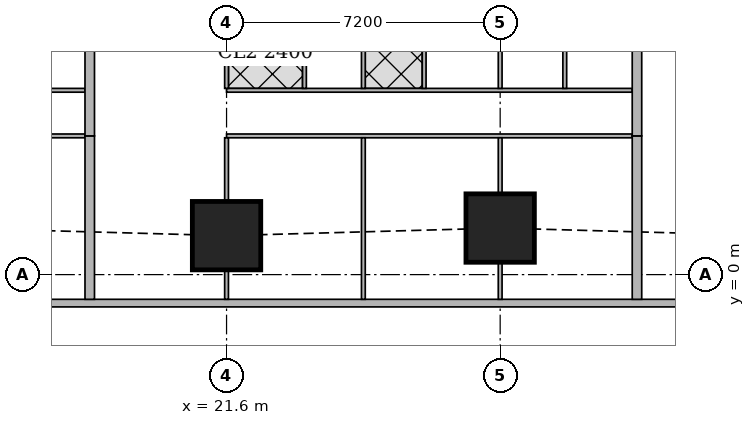
"""IFC4 building model, lengths in metres.
Left out: names, types, materials, properties, quantities, classifications, styles, units other than length and angle.
Written with IfcOpenShell. Run it as: python <this file> out.ifc"""

import sys

from ifc_helpers import new_model, si_unit, direction, frame, frame_2d, origin, origin_2d, place, context, subcontext, project, spatial, rectangle, extrude, element, fill, save


model = new_model("IFC4")
c1 = context("Model", 3, precision=1e-05, world=origin(), true_north=direction((0.0, 1.0)))
c2 = subcontext(c1, "Body", "Model", "MODEL_VIEW")
j1 = project(units=[si_unit("LENGTHUNIT", "METRE"), si_unit("PLANEANGLEUNIT", "RADIAN")], contexts=[c1])
p1 = place(None, origin())
s1 = spatial("IfcSite", under=j1, at=p1, CompositionType="ELEMENT")
p2 = place(p1, origin())
s2 = spatial("IfcBuilding", under=s1, at=p2, CompositionType="ELEMENT")
p3 = place(p2, frame((0.0, 0.0, 139.55)))
s3 = spatial("IfcBuildingStorey", under=s2, at=p3, CompositionType="ELEMENT", Elevation=139.55)
for number, where, z_axis, x_axis in (
    (1, (21.6, 1.025, 0.0), (0.0, 0.0, 1.0), (1.0, 0.0, 0.0)),
    (2, (28.8, 1.225, 0.0), (0.0, 0.0, 1.0), (1.0, 0.0, 0.0)),
):
    element("IfcColumn", number, at=place(p3, frame(where, z_axis=z_axis, x_axis=x_axis)), inside=s3, PredefinedType="COLUMN", context=c2, shape_type="SweptSolid", body=[
        extrude(rectangle(XDim=1.8, YDim=1.8, at=origin_2d()), origin(), (0.0, 0.0, 1.0), 3.75),
    ])
p4 = place(p3, frame((2.163, -0.75, 0.0), z_axis=(0.0, 0.0, 1.0), x_axis=(1.0, 0.0, 0.0)))
e3 = element("IfcWall", 3, at=p4, inside=s3, PredefinedType="SOLIDWALL", context=c2, shape_type="SweptSolid", body=[
    extrude(rectangle(XDim=45.628, YDim=0.2, at=frame_2d((22.814, 0.0))), origin(), (0.0, 0.0, 1.0), 3.5),
])
p5 = place(p4, frame((9.537, 0.0, 0.9)))
e4 = element("IfcOpeningElement", 4, at=p5, cuts=e3, PredefinedType="OPENING", context=c2, shape_type="SweptSolid", body=[
    extrude(rectangle(XDim=1.8, YDim=1.5, at=frame_2d((0.9, 0.75))), frame((0.0, 0.11, 0.0), z_axis=(0.0, -1.0, 0.0), x_axis=(1.0, 0.0, 0.0)), (0.0, 0.0, 1.0), 0.22),
])
p6 = place(p4, frame((13.137, 0.0, 0.9)))
e5 = element("IfcOpeningElement", 5, at=p6, cuts=e3, PredefinedType="OPENING", context=c2, shape_type="SweptSolid", body=[
    extrude(rectangle(XDim=1.8, YDim=1.5, at=frame_2d((0.9, 0.75))), frame((0.0, 0.11, 0.0), z_axis=(0.0, -1.0, 0.0), x_axis=(1.0, 0.0, 0.0)), (0.0, 0.0, 1.0), 0.22),
])
p7 = place(p4, frame((16.737, 0.0, 0.9)))
e6 = element("IfcOpeningElement", 6, at=p7, cuts=e3, PredefinedType="OPENING", context=c2, shape_type="SweptSolid", body=[
    extrude(rectangle(XDim=1.8, YDim=1.5, at=frame_2d((0.9, 0.75))), frame((0.0, 0.11, 0.0), z_axis=(0.0, -1.0, 0.0), x_axis=(1.0, 0.0, 0.0)), (0.0, 0.0, 1.0), 0.22),
])
p8 = place(p4, frame((20.337, 0.0, 0.9)))
e7 = element("IfcOpeningElement", 7, at=p8, cuts=e3, PredefinedType="OPENING", context=c2, shape_type="SweptSolid", body=[
    extrude(rectangle(XDim=1.8, YDim=1.5, at=frame_2d((0.9, 0.75))), frame((0.0, 0.11, 0.0), z_axis=(0.0, -1.0, 0.0), x_axis=(1.0, 0.0, 0.0)), (0.0, 0.0, 1.0), 0.22),
])
p9 = place(p4, frame((23.937, 0.0, 0.9)))
e8 = element("IfcOpeningElement", 8, at=p9, cuts=e3, PredefinedType="OPENING", context=c2, shape_type="SweptSolid", body=[
    extrude(rectangle(XDim=1.8, YDim=1.5, at=frame_2d((0.9, 0.75))), frame((0.0, 0.11, 0.0), z_axis=(0.0, -1.0, 0.0), x_axis=(1.0, 0.0, 0.0)), (0.0, 0.0, 1.0), 0.22),
])
p10 = place(p4, frame((27.537, 0.0, 0.9)))
e9 = element("IfcOpeningElement", 9, at=p10, cuts=e3, PredefinedType="OPENING", context=c2, shape_type="SweptSolid", body=[
    extrude(rectangle(XDim=1.8, YDim=1.5, at=frame_2d((0.9, 0.75))), frame((0.0, 0.11, 0.0), z_axis=(0.0, -1.0, 0.0), x_axis=(1.0, 0.0, 0.0)), (0.0, 0.0, 1.0), 0.22),
])
p11 = place(p4, frame((31.137, 0.0, 0.9)))
e10 = element("IfcOpeningElement", 10, at=p11, cuts=e3, PredefinedType="OPENING", context=c2, shape_type="SweptSolid", body=[
    extrude(rectangle(XDim=1.8, YDim=1.5, at=frame_2d((0.9, 0.75))), frame((0.0, 0.11, 0.0), z_axis=(0.0, -1.0, 0.0), x_axis=(1.0, 0.0, 0.0)), (0.0, 0.0, 1.0), 0.22),
])
p12 = place(p4, frame((34.737, 0.0, 0.9)))
e11 = element("IfcOpeningElement", 11, at=p12, cuts=e3, PredefinedType="OPENING", context=c2, shape_type="SweptSolid", body=[
    extrude(rectangle(XDim=1.8, YDim=1.5, at=frame_2d((0.9, 0.75))), frame((0.0, 0.11, 0.0), z_axis=(0.0, -1.0, 0.0), x_axis=(1.0, 0.0, 0.0)), (0.0, 0.0, 1.0), 0.22),
])
p13 = place(p3, frame((17.875, 3.65, 0.0), z_axis=(0.0, 0.0, 1.0), x_axis=(-1.0, 0.0, 0.0)))
e12 = element("IfcWall", 12, at=p13, inside=s3, PredefinedType="PARTITIONING", context=c2, shape_type="SweptSolid", body=[
    extrude(rectangle(XDim=3.475, YDim=0.1, at=frame_2d((1.738, 0.0))), origin(), (0.0, 0.0, 1.0), 3.5),
])
p14 = place(p13, frame((2.375, 0.0, 0.0)))
e13 = element("IfcOpeningElement", 13, at=p14, cuts=e12, PredefinedType="OPENING", context=c2, shape_type="SweptSolid", body=[
    extrude(rectangle(XDim=0.9, YDim=2.1, at=frame_2d((0.45, 1.05))), frame((0.0, 0.06, 0.0), z_axis=(0.0, -1.0, 0.0), x_axis=(1.0, 0.0, 0.0)), (0.0, 0.0, 1.0), 0.12),
])
p15 = place(p3, frame((17.875, 4.85, 0.0), z_axis=(0.0, 0.0, 1.0), x_axis=(-1.0, 0.0, 0.0)))
e14 = element("IfcWall", 14, at=p15, inside=s3, PredefinedType="PARTITIONING", context=c2, shape_type="SweptSolid", body=[
    extrude(rectangle(XDim=3.475, YDim=0.1, at=frame_2d((1.738, 0.0))), origin(), (0.0, 0.0, 1.0), 3.5),
])
p16 = place(p15, frame((2.0, 0.0, 0.0)))
e15 = element("IfcOpeningElement", 15, at=p16, cuts=e14, PredefinedType="OPENING", context=c2, shape_type="SweptSolid", body=[
    extrude(rectangle(XDim=0.9, YDim=2.1, at=frame_2d((0.45, 1.05))), frame((0.0, 0.06, 0.0), z_axis=(0.0, -1.0, 0.0), x_axis=(1.0, 0.0, 0.0)), (0.0, 0.0, 1.0), 0.12),
])
p17 = place(p15, frame((0.2, 0.0, 0.0)))
e16 = element("IfcOpeningElement", 16, at=p17, cuts=e14, PredefinedType="OPENING", context=c2, shape_type="SweptSolid", body=[
    extrude(rectangle(XDim=0.9, YDim=2.1, at=frame_2d((0.45, 1.05))), frame((0.0, 0.06, 0.0), z_axis=(0.0, -1.0, 0.0), x_axis=(1.0, 0.0, 0.0)), (0.0, 0.0, 1.0), 0.12),
])
p18 = place(p3, frame((32.275, 3.65, 0.0), z_axis=(0.0, 0.0, 1.0), x_axis=(-1.0, 0.0, 0.0)))
e17 = element("IfcWall", 17, at=p18, inside=s3, PredefinedType="PARTITIONING", context=c2, shape_type="SweptSolid", body=[
    extrude(rectangle(XDim=10.675, YDim=0.1, at=frame_2d((5.337, 0.0))), origin(), (0.0, 0.0, 1.0), 3.5),
])
p19 = place(p18, frame((9.575, 0.0, 0.0)))
e18 = element("IfcOpeningElement", 18, at=p19, cuts=e17, PredefinedType="OPENING", context=c2, shape_type="SweptSolid", body=[
    extrude(rectangle(XDim=0.9, YDim=2.1, at=frame_2d((0.45, 1.05))), frame((0.0, 0.06, 0.0), z_axis=(0.0, -1.0, 0.0), x_axis=(1.0, 0.0, 0.0)), (0.0, 0.0, 1.0), 0.12),
])
p20 = place(p18, frame((5.975, 0.0, 0.0)))
e19 = element("IfcOpeningElement", 19, at=p20, cuts=e17, PredefinedType="OPENING", context=c2, shape_type="SweptSolid", body=[
    extrude(rectangle(XDim=0.9, YDim=2.1, at=frame_2d((0.45, 1.05))), frame((0.0, 0.06, 0.0), z_axis=(0.0, -1.0, 0.0), x_axis=(1.0, 0.0, 0.0)), (0.0, 0.0, 1.0), 0.12),
])
p21 = place(p18, frame((2.375, 0.0, 0.0)))
e20 = element("IfcOpeningElement", 20, at=p21, cuts=e17, PredefinedType="OPENING", context=c2, shape_type="SweptSolid", body=[
    extrude(rectangle(XDim=0.9, YDim=2.1, at=frame_2d((0.45, 1.05))), frame((0.0, 0.06, 0.0), z_axis=(0.0, -1.0, 0.0), x_axis=(1.0, 0.0, 0.0)), (0.0, 0.0, 1.0), 0.12),
])
p22 = place(p3, frame((32.275, 4.85, 0.0), z_axis=(0.0, 0.0, 1.0), x_axis=(-1.0, 0.0, 0.0)))
e21 = element("IfcWall", 21, at=p22, inside=s3, PredefinedType="PARTITIONING", context=c2, shape_type="SweptSolid", body=[
    extrude(rectangle(XDim=10.675, YDim=0.1, at=frame_2d((5.337, 0.0))), origin(), (0.0, 0.0, 1.0), 3.5),
])
p23 = place(p22, frame((9.2, 0.0, 0.0)))
e22 = element("IfcOpeningElement", 22, at=p23, cuts=e21, PredefinedType="OPENING", context=c2, shape_type="SweptSolid", body=[
    extrude(rectangle(XDim=0.9, YDim=2.1, at=frame_2d((0.45, 1.05))), frame((0.0, 0.06, 0.0), z_axis=(0.0, -1.0, 0.0), x_axis=(1.0, 0.0, 0.0)), (0.0, 0.0, 1.0), 0.12),
])
p24 = place(p22, frame((5.825, 0.0, 0.0)))
e23 = element("IfcOpeningElement", 23, at=p24, cuts=e21, PredefinedType="OPENING", context=c2, shape_type="SweptSolid", body=[
    extrude(rectangle(XDim=0.9, YDim=2.1, at=frame_2d((0.45, 1.05))), frame((0.0, 0.06, 0.0), z_axis=(0.0, -1.0, 0.0), x_axis=(1.0, 0.0, 0.0)), (0.0, 0.0, 1.0), 0.12),
])
p25 = place(p22, frame((2.175, 0.0, 0.0)))
e24 = element("IfcOpeningElement", 24, at=p25, cuts=e21, PredefinedType="OPENING", context=c2, shape_type="SweptSolid", body=[
    extrude(rectangle(XDim=0.9, YDim=2.1, at=frame_2d((0.45, 1.05))), frame((0.0, 0.06, 0.0), z_axis=(0.0, -1.0, 0.0), x_axis=(1.0, 0.0, 0.0)), (0.0, 0.0, 1.0), 0.12),
])
p26 = place(p22, frame((7.4, 0.0, 0.0)))
e25 = element("IfcOpeningElement", 25, at=p26, cuts=e21, PredefinedType="OPENING", context=c2, shape_type="SweptSolid", body=[
    extrude(rectangle(XDim=0.9, YDim=2.1, at=frame_2d((0.45, 1.05))), frame((0.0, 0.06, 0.0), z_axis=(0.0, -1.0, 0.0), x_axis=(1.0, 0.0, 0.0)), (0.0, 0.0, 1.0), 0.12),
])
p27 = place(p22, frame((4.025, 0.0, 0.0)))
e26 = element("IfcOpeningElement", 26, at=p27, cuts=e21, PredefinedType="OPENING", context=c2, shape_type="SweptSolid", body=[
    extrude(rectangle(XDim=0.9, YDim=2.1, at=frame_2d((0.45, 1.05))), frame((0.0, 0.06, 0.0), z_axis=(0.0, -1.0, 0.0), x_axis=(1.0, 0.0, 0.0)), (0.0, 0.0, 1.0), 0.12),
])
p28 = place(p22, frame((0.375, 0.0, 0.0)))
e27 = element("IfcOpeningElement", 27, at=p28, cuts=e21, PredefinedType="OPENING", context=c2, shape_type="SweptSolid", body=[
    extrude(rectangle(XDim=0.9, YDim=2.1, at=frame_2d((0.45, 1.05))), frame((0.0, 0.06, 0.0), z_axis=(0.0, -1.0, 0.0), x_axis=(1.0, 0.0, 0.0)), (0.0, 0.0, 1.0), 0.12),
])
p29 = place(p3, frame((21.6, -0.65, 0.0), z_axis=(0.0, 0.0, 1.0), x_axis=(0.0, 1.0, 0.0)))
e28 = element("IfcWall", 28, at=p29, inside=s3, PredefinedType="PARTITIONING", context=c2, shape_type="SweptSolid", body=[
    extrude(rectangle(XDim=0.774, YDim=0.1, at=frame_2d((0.387, 0.0))), origin(), (0.0, 0.0, 1.0), 3.5),
])
p30 = place(p3, frame((21.6, 1.926, 0.0), z_axis=(0.0, 0.0, 1.0), x_axis=(0.0, 1.0, 0.0)))
e29 = element("IfcWall", 29, at=p30, inside=s3, PredefinedType="PARTITIONING", context=c2, shape_type="SweptSolid", body=[
    extrude(rectangle(XDim=1.674, YDim=0.1, at=frame_2d((0.837, 0.0))), origin(), (0.0, 0.0, 1.0), 3.5),
])
p31 = place(p3, frame((25.2, -0.65, 0.0), z_axis=(0.0, 0.0, 1.0), x_axis=(0.0, 1.0, 0.0)))
e30 = element("IfcWall", 30, at=p31, inside=s3, PredefinedType="PARTITIONING", context=c2, shape_type="SweptSolid", body=[
    extrude(rectangle(XDim=4.25, YDim=0.1, at=frame_2d((2.125, 0.0))), origin(), (0.0, 0.0, 1.0), 2.1),
])
p32 = place(p3, frame((28.8, -0.65, 0.0), z_axis=(0.0, 0.0, 1.0), x_axis=(0.0, 1.0, 0.0)))
e31 = element("IfcWall", 31, at=p32, inside=s3, PredefinedType="PARTITIONING", context=c2, shape_type="SweptSolid", body=[
    extrude(rectangle(XDim=0.974, YDim=0.1, at=frame_2d((0.487, 0.0))), origin(), (0.0, 0.0, 1.0), 3.5),
])
p33 = place(p3, frame((28.8, 2.126, 0.0), z_axis=(0.0, 0.0, 1.0), x_axis=(0.0, 1.0, 0.0)))
e32 = element("IfcWall", 32, at=p33, inside=s3, PredefinedType="PARTITIONING", context=c2, shape_type="SweptSolid", body=[
    extrude(rectangle(XDim=1.474, YDim=0.1, at=frame_2d((0.737, 0.0))), origin(), (0.0, 0.0, 1.0), 3.5),
])
p34 = place(p3, frame((21.6, 4.9, 0.0), z_axis=(0.0, 0.0, 1.0), x_axis=(0.0, 1.0, 0.0)))
e33 = element("IfcWall", 33, at=p34, inside=s3, PredefinedType="PARTITIONING", context=c2, shape_type="SweptSolid", body=[
    extrude(rectangle(XDim=1.849, YDim=0.1, at=frame_2d((0.925, 0.0))), origin(), (0.0, 0.0, 1.0), 3.5),
])
p35 = place(p3, frame((25.2, 4.9, 0.0), z_axis=(0.0, 0.0, 1.0), x_axis=(0.0, 1.0, 0.0)))
e34 = element("IfcWall", 34, at=p35, inside=s3, PredefinedType="PARTITIONING", context=c2, shape_type="SweptSolid", body=[
    extrude(rectangle(XDim=3.525, YDim=0.1, at=frame_2d((1.763, 0.0))), origin(), (0.0, 0.0, 1.0), 3.5),
])
p36 = place(p3, frame((28.8, 4.9, 0.0), z_axis=(0.0, 0.0, 1.0), x_axis=(0.0, 1.0, 0.0)))
e35 = element("IfcWall", 35, at=p36, inside=s3, PredefinedType="PARTITIONING", context=c2, shape_type="SweptSolid", body=[
    extrude(rectangle(XDim=1.849, YDim=0.1, at=frame_2d((0.925, 0.0))), origin(), (0.0, 0.0, 1.0), 3.5),
])
for number, where, z_axis, x_axis in (
    (36, (23.65, 4.9, 0.0), (0.0, 0.0, 1.0), (0.0, 1.0, 0.0)),
    (37, (26.8, 4.9, 0.0), (0.0, 0.0, 1.0), (0.0, 1.0, 0.0)),
    (38, (30.5, 4.9, 0.0), (0.0, 0.0, 1.0), (0.0, 1.0, 0.0)),
):
    element("IfcWall", number, at=place(p3, frame(where, z_axis=z_axis, x_axis=x_axis)), inside=s3, PredefinedType="PARTITIONING", context=c2, shape_type="SweptSolid", body=[
        extrude(rectangle(XDim=3.525, YDim=0.1, at=frame_2d((1.763, 0.0))), origin(), (0.0, 0.0, 1.0), 3.5),
    ])
p37 = place(p3, frame((18.0, -0.65, 0.0), z_axis=(0.0, 0.0, 1.0), x_axis=(0.0, 1.0, 0.0)))
e39 = element("IfcWall", 39, at=p37, inside=s3, PredefinedType="SOLIDWALL", context=c2, shape_type="SweptSolid", body=[
    extrude(rectangle(XDim=4.3, YDim=0.25, at=frame_2d((2.15, 0.0))), origin(), (0.0, 0.0, 1.0), 2.1),
])
p38 = place(p3, frame((18.0, 3.65, 0.0), z_axis=(0.0, 0.0, 1.0), x_axis=(0.0, 1.0, 0.0)))
e40 = element("IfcWall", 40, at=p38, inside=s3, PredefinedType="SOLIDWALL", context=c2, shape_type="SweptSolid", body=[
    extrude(rectangle(XDim=4.775, YDim=0.25, at=frame_2d((2.388, 0.0))), origin(), (0.0, 0.0, 1.0), 3.5),
])
p39 = place(p3, frame((32.4, -0.65, 0.0), z_axis=(0.0, 0.0, 1.0), x_axis=(0.0, 1.0, 0.0)))
e41 = element("IfcWall", 41, at=p39, inside=s3, PredefinedType="SOLIDWALL", context=c2, shape_type="SweptSolid", body=[
    extrude(rectangle(XDim=4.3, YDim=0.25, at=frame_2d((2.15, 0.0))), origin(), (0.0, 0.0, 1.0), 2.1),
])
p40 = place(p3, frame((32.4, 3.65, 0.0), z_axis=(0.0, 0.0, 1.0), x_axis=(0.0, 1.0, 0.0)))
e42 = element("IfcWall", 42, at=p40, inside=s3, PredefinedType="SOLIDWALL", context=c2, shape_type="SweptSolid", body=[
    extrude(rectangle(XDim=4.775, YDim=0.25, at=frame_2d((2.388, 0.0))), origin(), (0.0, 0.0, 1.0), 3.5),
])
p41 = place(p6, origin())
e43 = element("IfcWindow", 43, at=p41, inside=s3, PartitioningType="SINGLE_PANEL", PredefinedType="WINDOW", context=c2, shape_type="SweptSolid", body=[
    extrude(rectangle(XDim=1.8, YDim=1.5, at=frame_2d((0.9, 0.75))), frame((0.0, 0.03, 0.0), z_axis=(0.0, -1.0, 0.0), x_axis=(1.0, 0.0, 0.0)), (0.0, 0.0, 1.0), 0.06),
])
fill(e5, e43)
p42 = place(p7, origin())
e44 = element("IfcWindow", 44, at=p42, inside=s3, PartitioningType="SINGLE_PANEL", PredefinedType="WINDOW", context=c2, shape_type="SweptSolid", body=[
    extrude(rectangle(XDim=1.8, YDim=1.5, at=frame_2d((0.9, 0.75))), frame((0.0, 0.03, 0.0), z_axis=(0.0, -1.0, 0.0), x_axis=(1.0, 0.0, 0.0)), (0.0, 0.0, 1.0), 0.06),
])
fill(e6, e44)
p43 = place(p8, origin())
e45 = element("IfcWindow", 45, at=p43, inside=s3, PartitioningType="SINGLE_PANEL", PredefinedType="WINDOW", context=c2, shape_type="SweptSolid", body=[
    extrude(rectangle(XDim=1.8, YDim=1.5, at=frame_2d((0.9, 0.75))), frame((0.0, 0.03, 0.0), z_axis=(0.0, -1.0, 0.0), x_axis=(1.0, 0.0, 0.0)), (0.0, 0.0, 1.0), 0.06),
])
fill(e7, e45)
p44 = place(p9, origin())
e46 = element("IfcWindow", 46, at=p44, inside=s3, PartitioningType="SINGLE_PANEL", PredefinedType="WINDOW", context=c2, shape_type="SweptSolid", body=[
    extrude(rectangle(XDim=1.8, YDim=1.5, at=frame_2d((0.9, 0.75))), frame((0.0, 0.03, 0.0), z_axis=(0.0, -1.0, 0.0), x_axis=(1.0, 0.0, 0.0)), (0.0, 0.0, 1.0), 0.06),
])
fill(e8, e46)
p45 = place(p10, origin())
e47 = element("IfcWindow", 47, at=p45, inside=s3, PartitioningType="SINGLE_PANEL", PredefinedType="WINDOW", context=c2, shape_type="SweptSolid", body=[
    extrude(rectangle(XDim=1.8, YDim=1.5, at=frame_2d((0.9, 0.75))), frame((0.0, 0.03, 0.0), z_axis=(0.0, -1.0, 0.0), x_axis=(1.0, 0.0, 0.0)), (0.0, 0.0, 1.0), 0.06),
])
fill(e9, e47)
p46 = place(p11, origin())
e48 = element("IfcWindow", 48, at=p46, inside=s3, PartitioningType="SINGLE_PANEL", PredefinedType="WINDOW", context=c2, shape_type="SweptSolid", body=[
    extrude(rectangle(XDim=1.8, YDim=1.5, at=frame_2d((0.9, 0.75))), frame((0.0, 0.03, 0.0), z_axis=(0.0, -1.0, 0.0), x_axis=(1.0, 0.0, 0.0)), (0.0, 0.0, 1.0), 0.06),
])
fill(e10, e48)
p47 = place(p17, origin())
e49 = element("IfcDoor", 49, at=p47, inside=s3, OperationType="SINGLE_SWING_RIGHT", PredefinedType="DOOR", context=c2, shape_type="SweptSolid", body=[
    extrude(rectangle(XDim=0.9, YDim=2.1, at=frame_2d((0.45, 1.05))), frame((0.0, 0.025, 0.0), z_axis=(0.0, -1.0, 0.0), x_axis=(1.0, 0.0, 0.0)), (0.0, 0.0, 1.0), 0.05),
])
fill(e16, e49)
p48 = place(p19, origin())
e50 = element("IfcDoor", 50, at=p48, inside=s3, OperationType="SINGLE_SWING_RIGHT", PredefinedType="DOOR", context=c2, shape_type="SweptSolid", body=[
    extrude(rectangle(XDim=0.9, YDim=2.1, at=frame_2d((0.45, 1.05))), frame((0.0, 0.025, 0.0), z_axis=(0.0, -1.0, 0.0), x_axis=(1.0, 0.0, 0.0)), (0.0, 0.0, 1.0), 0.05),
])
fill(e18, e50)
p49 = place(p20, origin())
e51 = element("IfcDoor", 51, at=p49, inside=s3, OperationType="SINGLE_SWING_RIGHT", PredefinedType="DOOR", context=c2, shape_type="SweptSolid", body=[
    extrude(rectangle(XDim=0.9, YDim=2.1, at=frame_2d((0.45, 1.05))), frame((0.0, 0.025, 0.0), z_axis=(0.0, -1.0, 0.0), x_axis=(1.0, 0.0, 0.0)), (0.0, 0.0, 1.0), 0.05),
])
fill(e19, e51)
p50 = place(p21, origin())
e52 = element("IfcDoor", 52, at=p50, inside=s3, OperationType="SINGLE_SWING_RIGHT", PredefinedType="DOOR", context=c2, shape_type="SweptSolid", body=[
    extrude(rectangle(XDim=0.9, YDim=2.1, at=frame_2d((0.45, 1.05))), frame((0.0, 0.025, 0.0), z_axis=(0.0, -1.0, 0.0), x_axis=(1.0, 0.0, 0.0)), (0.0, 0.0, 1.0), 0.05),
])
fill(e20, e52)
p51 = place(p23, origin())
e53 = element("IfcDoor", 53, at=p51, inside=s3, OperationType="SINGLE_SWING_LEFT", PredefinedType="DOOR", context=c2, shape_type="SweptSolid", body=[
    extrude(rectangle(XDim=0.9, YDim=2.1, at=frame_2d((0.45, 1.05))), frame((0.0, 0.025, 0.0), z_axis=(0.0, -1.0, 0.0), x_axis=(1.0, 0.0, 0.0)), (0.0, 0.0, 1.0), 0.05),
])
fill(e22, e53)
p52 = place(p24, origin())
e54 = element("IfcDoor", 54, at=p52, inside=s3, OperationType="SINGLE_SWING_RIGHT", PredefinedType="DOOR", context=c2, shape_type="SweptSolid", body=[
    extrude(rectangle(XDim=0.9, YDim=2.1, at=frame_2d((0.45, 1.05))), frame((0.0, 0.025, 0.0), z_axis=(0.0, -1.0, 0.0), x_axis=(1.0, 0.0, 0.0)), (0.0, 0.0, 1.0), 0.05),
])
fill(e23, e54)
p53 = place(p25, origin())
e55 = element("IfcDoor", 55, at=p53, inside=s3, OperationType="SINGLE_SWING_RIGHT", PredefinedType="DOOR", context=c2, shape_type="SweptSolid", body=[
    extrude(rectangle(XDim=0.9, YDim=2.1, at=frame_2d((0.45, 1.05))), frame((0.0, 0.025, 0.0), z_axis=(0.0, -1.0, 0.0), x_axis=(1.0, 0.0, 0.0)), (0.0, 0.0, 1.0), 0.05),
])
fill(e24, e55)
p54 = place(p26, origin())
e56 = element("IfcDoor", 56, at=p54, inside=s3, OperationType="SINGLE_SWING_LEFT", PredefinedType="DOOR", context=c2, shape_type="SweptSolid", body=[
    extrude(rectangle(XDim=0.9, YDim=2.1, at=frame_2d((0.45, 1.05))), frame((0.0, 0.025, 0.0), z_axis=(0.0, -1.0, 0.0), x_axis=(1.0, 0.0, 0.0)), (0.0, 0.0, 1.0), 0.05),
])
fill(e25, e56)
p55 = place(p27, origin())
e57 = element("IfcDoor", 57, at=p55, inside=s3, OperationType="SINGLE_SWING_LEFT", PredefinedType="DOOR", context=c2, shape_type="SweptSolid", body=[
    extrude(rectangle(XDim=0.9, YDim=2.1, at=frame_2d((0.45, 1.05))), frame((0.0, 0.025, 0.0), z_axis=(0.0, -1.0, 0.0), x_axis=(1.0, 0.0, 0.0)), (0.0, 0.0, 1.0), 0.05),
])
fill(e26, e57)
p56 = place(p28, origin())
e58 = element("IfcDoor", 58, at=p56, inside=s3, OperationType="SINGLE_SWING_RIGHT", PredefinedType="DOOR", context=c2, shape_type="SweptSolid", body=[
    extrude(rectangle(XDim=0.9, YDim=2.1, at=frame_2d((0.45, 1.05))), frame((0.0, 0.025, 0.0), z_axis=(0.0, -1.0, 0.0), x_axis=(1.0, 0.0, 0.0)), (0.0, 0.0, 1.0), 0.05),
])
fill(e27, e58)
save(model, sys.argv[1])
